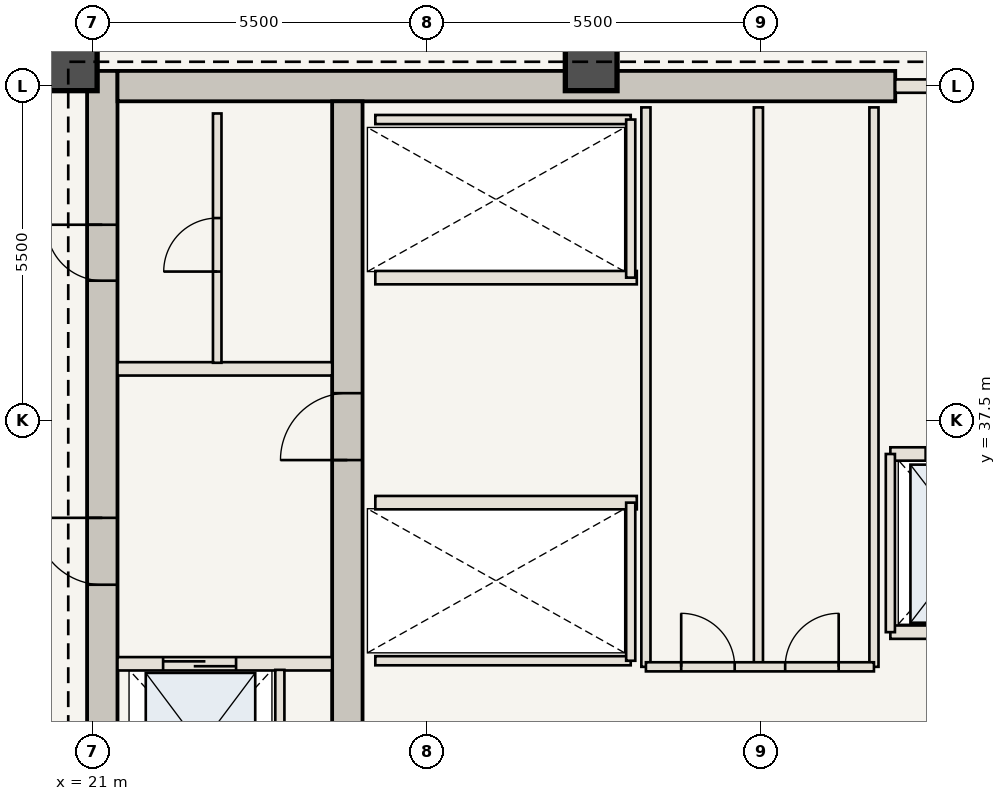
"""IFC4 building model, lengths in metres.
Left out: names, types, materials, properties, quantities, classifications, styles, units other than length and angle.
Written with IfcOpenShell. Run it as: python <this file> out.ifc"""

import sys

from ifc_helpers import new_model, si_unit, direction, frame, frame_2d, origin, origin_2d, place, context, subcontext, project, spatial, rectangle, extrude, element, fill, save


model = new_model("IFC4")
c1 = context("Model", 3, precision=1e-05, world=origin(), true_north=direction((0.0, 1.0)))
c2 = subcontext(c1, "Body", "Model", "MODEL_VIEW")
j1 = project(units=[si_unit("LENGTHUNIT", "METRE"), si_unit("PLANEANGLEUNIT", "RADIAN")], contexts=[c1])
p1 = place(None, origin())
s1 = spatial("IfcSite", under=j1, at=p1, CompositionType="ELEMENT")
p2 = place(p1, origin())
s2 = spatial("IfcBuilding", under=s1, at=p2, CompositionType="ELEMENT")
p3 = place(p2, frame((0.0, 0.0, 229.25)))
s3 = spatial("IfcBuildingStorey", under=s2, at=p3, CompositionType="ELEMENT", Elevation=229.25)
p4 = place(p3, frame((21.16, 30.6, 0.0), z_axis=(0.0, 0.0, 1.0), x_axis=(0.0, 1.0, 0.0)))
e1 = element("IfcWall", 1, at=p4, inside=s3, PredefinedType="SHEAR", context=c2, shape_type="SweptSolid", body=[
    extrude(rectangle(XDim=12.65, YDim=0.5, at=frame_2d((6.325, 0.0))), origin(), (0.0, 0.0, 1.0), 3.85),
])
p5 = place(p4, frame((4.2, 0.0, 0.0)))
e2 = element("IfcOpeningElement", 2, at=p5, cuts=e1, PredefinedType="OPENING", context=c2, shape_type="SweptSolid", body=[
    extrude(rectangle(XDim=1.1, YDim=2.15, at=frame_2d((0.55, 1.075))), frame((0.0, 0.26, 0.0), z_axis=(0.0, -1.0, 0.0), x_axis=(1.0, 0.0, 0.0)), (0.0, 0.0, 1.0), 0.52),
])
p6 = place(p4, frame((9.2, 0.0, 0.0)))
e3 = element("IfcOpeningElement", 3, at=p6, cuts=e1, PredefinedType="OPENING", context=c2, shape_type="SweptSolid", body=[
    extrude(rectangle(XDim=0.92, YDim=2.1, at=frame_2d((0.46, 1.05))), frame((0.0, 0.26, 0.0), z_axis=(0.0, -1.0, 0.0), x_axis=(1.0, 0.0, 0.0)), (0.0, 0.0, 1.0), 0.52),
])
p7 = place(p3, frame((21.41, 43.0, 0.0), z_axis=(0.0, 0.0, 1.0), x_axis=(1.0, 0.0, 0.0)))
e4 = element("IfcWall", 4, at=p7, inside=s3, PredefinedType="SHEAR", context=c2, shape_type="SweptSolid", body=[
    extrude(rectangle(XDim=12.79, YDim=0.5, at=frame_2d((6.395, 0.0))), origin(), (0.0, 0.0, 1.0), 3.85),
])
p8 = place(p3, frame((25.19, 30.6, 0.0), z_axis=(0.0, 0.0, 1.0), x_axis=(0.0, 1.0, 0.0)))
e5 = element("IfcWall", 5, at=p8, inside=s3, PredefinedType="SHEAR", context=c2, shape_type="SweptSolid", body=[
    extrude(rectangle(XDim=12.15, YDim=0.5, at=frame_2d((6.075, 0.0))), origin(), (0.0, 0.0, 1.0), 3.85),
])
p9 = place(p8, frame((6.25, 0.0, 0.0)))
e6 = element("IfcOpeningElement", 6, at=p9, cuts=e5, PredefinedType="OPENING", context=c2, shape_type="SweptSolid", body=[
    extrude(rectangle(XDim=1.1, YDim=2.15, at=frame_2d((0.55, 1.075))), frame((0.0, 0.26, 0.0), z_axis=(0.0, -1.0, 0.0), x_axis=(1.0, 0.0, 0.0)), (0.0, 0.0, 1.0), 0.52),
])
for number, where, z_axis, x_axis in (
    (7, (29.2, 43.35, 0.0), (0.0, 0.0, 1.0), (1.0, 0.0, 0.0)),
    (8, (20.65, 43.35, 0.0), (0.0, 0.0, 1.0), (1.0, 0.0, 0.0)),
):
    element("IfcColumn", number, at=place(p3, frame(where, z_axis=z_axis, x_axis=x_axis)), inside=s3, PredefinedType="COLUMN", context=c2, shape_type="SweptSolid", body=[
        extrude(rectangle(XDim=0.85, YDim=0.85, at=origin_2d()), origin(), (0.0, 0.0, 1.0), 3.85),
    ])
p10 = place(p3, frame((21.41, 33.5, 0.0), z_axis=(0.0, 0.0, 1.0), x_axis=(1.0, 0.0, 0.0)))
e9 = element("IfcWall", 9, at=p10, inside=s3, PredefinedType="STANDARD", context=c2, shape_type="SweptSolid", body=[
    extrude(rectangle(XDim=3.53, YDim=0.22, at=frame_2d((1.765, 0.0))), origin(), (0.0, 0.0, 1.0), 3.685),
])
p11 = place(p10, frame((0.75, 0.0, 0.0)))
e10 = element("IfcOpeningElement", 10, at=p11, cuts=e9, PredefinedType="OPENING", context=c2, shape_type="SweptSolid", body=[
    extrude(rectangle(XDim=1.2, YDim=2.2, at=frame_2d((0.6, 1.1))), frame((0.0, 0.12, 0.0), z_axis=(0.0, -1.0, 0.0), x_axis=(1.0, 0.0, 0.0)), (0.0, 0.0, 1.0), 0.24),
])
p12 = place(p3, frame((24.08, 30.75, 0.0), z_axis=(0.0, 0.0, 1.0), x_axis=(0.0, 1.0, 0.0)))
e11 = element("IfcWall", 11, at=p12, inside=s3, PredefinedType="STANDARD", context=c2, shape_type="SweptSolid", body=[
    extrude(rectangle(XDim=2.65, YDim=0.15, at=frame_2d((1.325, 0.0))), origin(), (0.0, 0.0, 1.0), 3.685),
])
p13 = place(p3, frame((21.41, 38.35, 0.0), z_axis=(0.0, 0.0, 1.0), x_axis=(1.0, 0.0, 0.0)))
e12 = element("IfcWall", 12, at=p13, inside=s3, PredefinedType="STANDARD", context=c2, shape_type="SweptSolid", body=[
    extrude(rectangle(XDim=3.53, YDim=0.22, at=frame_2d((1.765, 0.0))), origin(), (0.0, 0.0, 1.0), 3.685),
])
p14 = place(p3, frame((23.05, 38.45, 0.0), z_axis=(0.0, 0.0, 1.0), x_axis=(0.0, 1.0, 0.0)))
e13 = element("IfcWall", 13, at=p14, inside=s3, PredefinedType="STANDARD", context=c2, shape_type="SweptSolid", body=[
    extrude(rectangle(XDim=4.1, YDim=0.14, at=frame_2d((2.05, 0.0))), origin(), (0.0, 0.0, 1.0), 3.685),
])
p15 = place(p14, frame((1.5, 0.0, 0.0)))
e14 = element("IfcOpeningElement", 14, at=p15, cuts=e13, PredefinedType="OPENING", context=c2, shape_type="SweptSolid", body=[
    extrude(rectangle(XDim=0.88, YDim=2.1, at=frame_2d((0.44, 1.05))), frame((0.0, 0.08, 0.0), z_axis=(0.0, -1.0, 0.0), x_axis=(1.0, 0.0, 0.0)), (0.0, 0.0, 1.0), 0.16),
])
p16 = place(p3, frame((25.65, 36.15, 0.0), z_axis=(0.0, 0.0, 1.0), x_axis=(1.0, 0.0, 0.0)))
e15 = element("IfcWall", 15, at=p16, inside=s3, PredefinedType="STANDARD", context=c2, shape_type="SweptSolid", body=[
    extrude(rectangle(XDim=4.3, YDim=0.22, at=frame_2d((2.15, 0.0))), origin(), (0.0, 0.0, 1.0), 3.685),
])
p17 = place(p3, frame((25.65, 33.55, 0.0), z_axis=(0.0, 0.0, 1.0), x_axis=(1.0, 0.0, 0.0)))
e16 = element("IfcWall", 16, at=p17, inside=s3, PredefinedType="STANDARD", context=c2, shape_type="SweptSolid", body=[
    extrude(rectangle(XDim=4.2, YDim=0.15, at=frame_2d((2.1, 0.0))), origin(), (0.0, 0.0, 1.0), 3.685),
])
p18 = place(p3, frame((29.85, 33.55, 0.0), z_axis=(0.0, 0.0, 1.0), x_axis=(0.0, 1.0, 0.0)))
e17 = element("IfcWall", 17, at=p18, inside=s3, PredefinedType="STANDARD", context=c2, shape_type="SweptSolid", body=[
    extrude(rectangle(XDim=2.6, YDim=0.15, at=frame_2d((1.3, 0.0))), origin(), (0.0, 0.0, 1.0), 3.685),
])
p19 = place(p3, frame((25.65, 39.85, 0.0), z_axis=(0.0, 0.0, 1.0), x_axis=(1.0, 0.0, 0.0)))
e18 = element("IfcWall", 18, at=p19, inside=s3, PredefinedType="STANDARD", context=c2, shape_type="SweptSolid", body=[
    extrude(rectangle(XDim=4.3, YDim=0.22, at=frame_2d((2.15, 0.0))), origin(), (0.0, 0.0, 1.0), 3.685),
])
p20 = place(p3, frame((25.65, 42.45, 0.0), z_axis=(0.0, 0.0, 1.0), x_axis=(1.0, 0.0, 0.0)))
e19 = element("IfcWall", 19, at=p20, inside=s3, PredefinedType="STANDARD", context=c2, shape_type="SweptSolid", body=[
    extrude(rectangle(XDim=4.2, YDim=0.15, at=frame_2d((2.1, 0.0))), origin(), (0.0, 0.0, 1.0), 3.685),
])
p21 = place(p3, frame((29.85, 39.85, 0.0), z_axis=(0.0, 0.0, 1.0), x_axis=(0.0, 1.0, 0.0)))
e20 = element("IfcWall", 20, at=p21, inside=s3, PredefinedType="STANDARD", context=c2, shape_type="SweptSolid", body=[
    extrude(rectangle(XDim=2.6, YDim=0.15, at=frame_2d((1.3, 0.0))), origin(), (0.0, 0.0, 1.0), 3.685),
])
for number, where, z_axis, x_axis in (
    (21, (30.1, 33.45, 0.0), (0.0, 0.0, 1.0), (0.0, 1.0, 0.0)),
    (22, (31.95, 33.45, 0.0), (0.0, 0.0, 1.0), (0.0, 1.0, 0.0)),
    (23, (33.85, 33.45, 0.0), (0.0, 0.0, 1.0), (0.0, 1.0, 0.0)),
):
    element("IfcWall", number, at=place(p3, frame(where, z_axis=z_axis, x_axis=x_axis)), inside=s3, PredefinedType="STANDARD", context=c2, shape_type="SweptSolid", body=[
        extrude(rectangle(XDim=9.2, YDim=0.15, at=frame_2d((4.6, 0.0))), origin(), (0.0, 0.0, 1.0), 3.685),
    ])
p22 = place(p3, frame((30.1, 33.45, 0.0), z_axis=(0.0, 0.0, 1.0), x_axis=(1.0, 0.0, 0.0)))
e24 = element("IfcWall", 24, at=p22, inside=s3, PredefinedType="STANDARD", context=c2, shape_type="SweptSolid", body=[
    extrude(rectangle(XDim=3.75, YDim=0.15, at=frame_2d((1.875, 0.0))), origin(), (0.0, 0.0, 1.0), 3.685),
])
p23 = place(p22, frame((0.58, 0.0, 0.0)))
e25 = element("IfcOpeningElement", 25, at=p23, cuts=e24, PredefinedType="OPENING", context=c2, shape_type="SweptSolid", body=[
    extrude(rectangle(XDim=0.88, YDim=2.1, at=frame_2d((0.44, 1.05))), frame((0.0, 0.085, 0.0), z_axis=(0.0, -1.0, 0.0), x_axis=(1.0, 0.0, 0.0)), (0.0, 0.0, 1.0), 0.17),
])
p24 = place(p22, frame((2.29, 0.0, 0.0)))
e26 = element("IfcOpeningElement", 26, at=p24, cuts=e24, PredefinedType="OPENING", context=c2, shape_type="SweptSolid", body=[
    extrude(rectangle(XDim=0.88, YDim=2.1, at=frame_2d((0.44, 1.05))), frame((0.0, 0.085, 0.0), z_axis=(0.0, -1.0, 0.0), x_axis=(1.0, 0.0, 0.0)), (0.0, 0.0, 1.0), 0.17),
])
p25 = place(p3, frame((34.2, 43.0, 0.0), z_axis=(0.0, 0.0, 1.0), x_axis=(1.0, 0.0, 0.0)))
e27 = element("IfcWall", 27, at=p25, inside=s3, PredefinedType="STANDARD", context=c2, shape_type="SweptSolid", body=[
    extrude(rectangle(XDim=3.55, YDim=0.22, at=frame_2d((1.775, 0.0))), origin(), (0.0, 0.0, 1.0), 3.685),
])
p26 = place(p25, frame((1.4, 0.0, 0.0)))
e28 = element("IfcOpeningElement", 28, at=p26, cuts=e27, PredefinedType="OPENING", context=c2, shape_type="SweptSolid", body=[
    extrude(rectangle(XDim=1.1, YDim=2.15, at=frame_2d((0.55, 1.075))), frame((0.0, 0.12, 0.0), z_axis=(0.0, -1.0, 0.0), x_axis=(1.0, 0.0, 0.0)), (0.0, 0.0, 1.0), 0.24),
])
p27 = place(p3, frame((34.12, 36.95, 0.0), z_axis=(0.0, 0.0, 1.0), x_axis=(1.0, 0.0, 0.0)))
e29 = element("IfcWall", 29, at=p27, inside=s3, PredefinedType="STANDARD", context=c2, shape_type="SweptSolid", body=[
    extrude(rectangle(XDim=2.68, YDim=0.22, at=frame_2d((1.34, 0.0))), origin(), (0.0, 0.0, 1.0), 3.685),
])
p28 = place(p27, frame((0.58, 0.0, 0.0)))
e30 = element("IfcOpeningElement", 30, at=p28, cuts=e29, PredefinedType="OPENING", context=c2, shape_type="SweptSolid", body=[
    extrude(rectangle(XDim=1.2, YDim=2.2, at=frame_2d((0.6, 1.1))), frame((0.0, 0.12, 0.0), z_axis=(0.0, -1.0, 0.0), x_axis=(1.0, 0.0, 0.0)), (0.0, 0.0, 1.0), 0.24),
])
p29 = place(p3, frame((34.12, 34.02, 0.0), z_axis=(0.0, 0.0, 1.0), x_axis=(1.0, 0.0, 0.0)))
e31 = element("IfcWall", 31, at=p29, inside=s3, PredefinedType="STANDARD", context=c2, shape_type="SweptSolid", body=[
    extrude(rectangle(XDim=2.68, YDim=0.22, at=frame_2d((1.34, 0.0))), origin(), (0.0, 0.0, 1.0), 3.685),
])
p30 = place(p3, frame((34.12, 34.02, 0.0), z_axis=(0.0, 0.0, 1.0), x_axis=(0.0, 1.0, 0.0)))
e32 = element("IfcWall", 32, at=p30, inside=s3, PredefinedType="STANDARD", context=c2, shape_type="SweptSolid", body=[
    extrude(rectangle(XDim=2.93, YDim=0.15, at=frame_2d((1.465, 0.0))), origin(), (0.0, 0.0, 1.0), 3.685),
])
p31 = place(p5, origin())
e33 = element("IfcDoor", 33, at=p31, inside=s3, OperationType="SINGLE_SWING_RIGHT", PredefinedType="DOOR", context=c2, shape_type="SweptSolid", body=[
    extrude(rectangle(XDim=1.1, YDim=2.15, at=frame_2d((0.55, 1.075))), frame((0.0, 0.025, 0.0), z_axis=(0.0, -1.0, 0.0), x_axis=(1.0, 0.0, 0.0)), (0.0, 0.0, 1.0), 0.05),
])
fill(e2, e33)
p32 = place(p9, origin())
e34 = element("IfcDoor", 34, at=p32, inside=s3, OperationType="SINGLE_SWING_LEFT", PredefinedType="DOOR", context=c2, shape_type="SweptSolid", body=[
    extrude(rectangle(XDim=1.1, YDim=2.15, at=frame_2d((0.55, 1.075))), frame((0.0, 0.025, 0.0), z_axis=(0.0, -1.0, 0.0), x_axis=(1.0, 0.0, 0.0)), (0.0, 0.0, 1.0), 0.05),
])
fill(e6, e34)
p33 = place(p6, origin())
e35 = element("IfcDoor", 35, at=p33, inside=s3, OperationType="SINGLE_SWING_RIGHT", PredefinedType="DOOR", context=c2, shape_type="SweptSolid", body=[
    extrude(rectangle(XDim=0.92, YDim=2.1, at=frame_2d((0.46, 1.05))), frame((0.0, 0.025, 0.0), z_axis=(0.0, -1.0, 0.0), x_axis=(1.0, 0.0, 0.0)), (0.0, 0.0, 1.0), 0.05),
])
fill(e3, e35)
p34 = place(p11, origin())
e36 = element("IfcDoor", 36, at=p34, inside=s3, OperationType="DOUBLE_DOOR_SLIDING", PredefinedType="DOOR", context=c2, shape_type="SweptSolid", body=[
    extrude(rectangle(XDim=1.2, YDim=2.2, at=frame_2d((0.6, 1.1))), frame((0.0, 0.025, 0.0), z_axis=(0.0, -1.0, 0.0), x_axis=(1.0, 0.0, 0.0)), (0.0, 0.0, 1.0), 0.05),
])
fill(e10, e36)
p35 = place(p15, origin())
e37 = element("IfcDoor", 37, at=p35, inside=s3, OperationType="SINGLE_SWING_LEFT", PredefinedType="DOOR", context=c2, shape_type="SweptSolid", body=[
    extrude(rectangle(XDim=0.88, YDim=2.1, at=frame_2d((0.44, 1.05))), frame((0.0, 0.025, 0.0), z_axis=(0.0, -1.0, 0.0), x_axis=(1.0, 0.0, 0.0)), (0.0, 0.0, 1.0), 0.05),
])
fill(e14, e37)
p36 = place(p23, origin())
e38 = element("IfcDoor", 38, at=p36, inside=s3, OperationType="SINGLE_SWING_LEFT", PredefinedType="DOOR", context=c2, shape_type="SweptSolid", body=[
    extrude(rectangle(XDim=0.88, YDim=2.1, at=frame_2d((0.44, 1.05))), frame((0.0, 0.025, 0.0), z_axis=(0.0, -1.0, 0.0), x_axis=(1.0, 0.0, 0.0)), (0.0, 0.0, 1.0), 0.05),
])
fill(e25, e38)
p37 = place(p24, origin())
e39 = element("IfcDoor", 39, at=p37, inside=s3, OperationType="SINGLE_SWING_RIGHT", PredefinedType="DOOR", context=c2, shape_type="SweptSolid", body=[
    extrude(rectangle(XDim=0.88, YDim=2.1, at=frame_2d((0.44, 1.05))), frame((0.0, 0.025, 0.0), z_axis=(0.0, -1.0, 0.0), x_axis=(1.0, 0.0, 0.0)), (0.0, 0.0, 1.0), 0.05),
])
fill(e26, e39)
p38 = place(p28, origin())
e40 = element("IfcDoor", 40, at=p38, inside=s3, OperationType="DOUBLE_DOOR_SLIDING", PredefinedType="DOOR", context=c2, shape_type="SweptSolid", body=[
    extrude(rectangle(XDim=1.2, YDim=2.2, at=frame_2d((0.6, 1.1))), frame((0.0, 0.025, 0.0), z_axis=(0.0, -1.0, 0.0), x_axis=(1.0, 0.0, 0.0)), (0.0, 0.0, 1.0), 0.05),
])
fill(e30, e40)
save(model, sys.argv[1])
